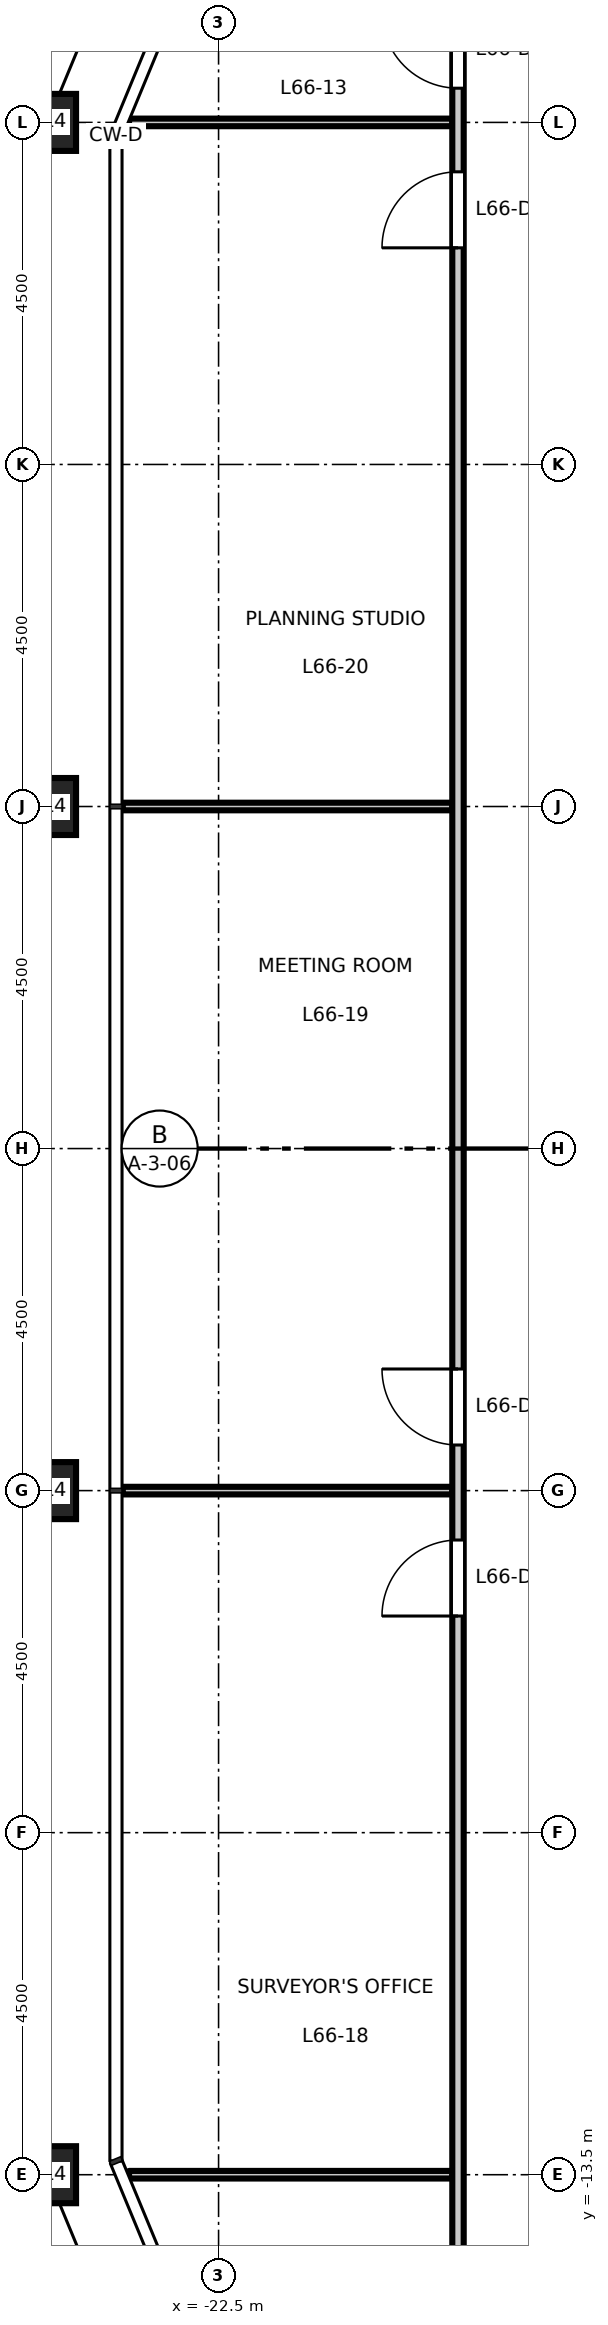
"""IFC4 building model, lengths in metres.
Left out: names, types, materials, properties, quantities, classifications, styles, units other than length and angle.
Written with IfcOpenShell. Run it as: python <this file> out.ifc"""

import sys

from ifc_helpers import new_model, si_unit, direction, frame, frame_2d, origin, origin_2d, place, context, subcontext, project, spatial, rectangle, hollow_rectangle, extrude, element, fill, save


model = new_model("IFC4")
c1 = context("Model", 3, precision=1e-05, world=origin(), true_north=direction((0.0, 1.0)))
c2 = subcontext(c1, "Body", "Model", "MODEL_VIEW")
j1 = project(units=[si_unit("LENGTHUNIT", "METRE"), si_unit("PLANEANGLEUNIT", "RADIAN")], contexts=[c1])
p1 = place(None, origin())
s1 = spatial("IfcSite", under=j1, at=p1, CompositionType="ELEMENT")
p2 = place(p1, origin())
s2 = spatial("IfcBuilding", under=s1, at=p2, CompositionType="ELEMENT")
p3 = place(p2, frame((0.0, 0.0, 307.7)))
s3 = spatial("IfcBuildingStorey", under=s2, at=p3, CompositionType="ELEMENT", Elevation=307.7)
for number, where, z_axis, x_axis in (
    (1, (-24.75, 13.5, 0.0), (0.0, 0.0, 1.0), (1.0, 0.0, 0.0)),
    (2, (-24.75, 4.5, 0.0), (0.0, 0.0, 1.0), (1.0, 0.0, 0.0)),
    (3, (-24.75, -4.5, 0.0), (0.0, 0.0, 1.0), (1.0, 0.0, 0.0)),
    (4, (-24.75, -13.5, 0.0), (0.0, 0.0, 1.0), (1.0, 0.0, 0.0)),
):
    element("IfcColumn", number, at=place(p3, frame(where, z_axis=z_axis, x_axis=x_axis)), inside=s3, PredefinedType="COLUMN", context=c2, shape_type="SweptSolid", body=[
        extrude(hollow_rectangle(XDim=0.75, YDim=0.75, WallThickness=0.04, at=origin_2d()), origin(), (0.0, 0.0, 1.0), 4.5),
    ])
p4 = place(p3, frame((-23.678, -13.5, 0.0), z_axis=(0.0, 0.0, 1.0), x_axis=(1.0, 0.0, 0.0)))
e5 = element("IfcWall", 5, at=p4, inside=s3, PredefinedType="PARTITIONING", context=c2, shape_type="SweptSolid", body=[
    extrude(rectangle(XDim=4.253, YDim=0.1, at=frame_2d((2.126, 0.0))), origin(), (0.0, 0.0, 1.0), 4.35),
])
for number, where, z_axis, x_axis in (
    (6, (-23.76, -4.5, 0.0), (0.0, 0.0, 1.0), (1.0, 0.0, 0.0)),
    (7, (-23.76, 4.5, 0.0), (0.0, 0.0, 1.0), (1.0, 0.0, 0.0)),
):
    element("IfcWall", number, at=place(p3, frame(where, z_axis=z_axis, x_axis=x_axis)), inside=s3, PredefinedType="PARTITIONING", context=c2, shape_type="SweptSolid", body=[
        extrude(rectangle(XDim=4.335, YDim=0.1, at=frame_2d((2.167, 0.0))), origin(), (0.0, 0.0, 1.0), 4.35),
    ])
p5 = place(p3, frame((-23.678, 13.5, 0.0), z_axis=(0.0, 0.0, 1.0), x_axis=(1.0, 0.0, 0.0)))
e8 = element("IfcWall", 8, at=p5, inside=s3, PredefinedType="PARTITIONING", context=c2, shape_type="SweptSolid", body=[
    extrude(rectangle(XDim=4.253, YDim=0.1, at=frame_2d((2.126, 0.0))), origin(), (0.0, 0.0, 1.0), 4.35),
])
p6 = place(p3, frame((-19.35, -15.525, 0.0), z_axis=(0.0, 0.0, 1.0), x_axis=(0.0, 1.0, 0.0)))
e9 = element("IfcWall", 9, at=p6, inside=s3, PredefinedType="PARTITIONING", context=c2, shape_type="SweptSolid", body=[
    extrude(rectangle(XDim=31.05, YDim=0.15, at=frame_2d((15.525, 0.0))), origin(), (0.0, 0.0, 1.0), 4.35),
])
p7 = place(p6, frame((29.475, 0.0, 0.0)))
e10 = element("IfcOpeningElement", 10, at=p7, cuts=e9, PredefinedType="OPENING", context=c2, shape_type="SweptSolid", body=[
    extrude(rectangle(XDim=1.0, YDim=2.1, at=frame_2d((0.5, 1.05))), frame((0.0, 0.085, 0.0), z_axis=(0.0, -1.0, 0.0), x_axis=(1.0, 0.0, 0.0)), (0.0, 0.0, 1.0), 0.17),
])
p8 = place(p6, frame((9.375, 0.0, 0.0)))
e11 = element("IfcOpeningElement", 11, at=p8, cuts=e9, PredefinedType="OPENING", context=c2, shape_type="SweptSolid", body=[
    extrude(rectangle(XDim=1.0, YDim=2.1, at=frame_2d((0.5, 1.05))), frame((0.0, 0.085, 0.0), z_axis=(0.0, -1.0, 0.0), x_axis=(1.0, 0.0, 0.0)), (0.0, 0.0, 1.0), 0.17),
])
p9 = place(p6, frame((11.625, 0.0, 0.0)))
e12 = element("IfcOpeningElement", 12, at=p9, cuts=e9, PredefinedType="OPENING", context=c2, shape_type="SweptSolid", body=[
    extrude(rectangle(XDim=1.0, YDim=2.1, at=frame_2d((0.5, 1.05))), frame((0.0, 0.085, 0.0), z_axis=(0.0, -1.0, 0.0), x_axis=(1.0, 0.0, 0.0)), (0.0, 0.0, 1.0), 0.17),
])
p10 = place(p6, frame((27.375, 0.0, 0.0)))
e13 = element("IfcOpeningElement", 13, at=p10, cuts=e9, PredefinedType="OPENING", context=c2, shape_type="SweptSolid", body=[
    extrude(rectangle(XDim=1.0, YDim=2.1, at=frame_2d((0.5, 1.05))), frame((0.0, 0.085, 0.0), z_axis=(0.0, -1.0, 0.0), x_axis=(1.0, 0.0, 0.0)), (0.0, 0.0, 1.0), 0.17),
])
p11 = place(p7, origin())
e14 = element("IfcDoor", 14, at=p11, inside=s3, OperationType="SINGLE_SWING_RIGHT", PredefinedType="DOOR", context=c2, shape_type="SweptSolid", body=[
    extrude(rectangle(XDim=1.0, YDim=2.1, at=frame_2d((0.5, 1.05))), frame((0.0, 0.025, 0.0), z_axis=(0.0, -1.0, 0.0), x_axis=(1.0, 0.0, 0.0)), (0.0, 0.0, 1.0), 0.05),
])
fill(e10, e14)
p12 = place(p8, origin())
e15 = element("IfcDoor", 15, at=p12, inside=s3, OperationType="SINGLE_SWING_LEFT", PredefinedType="DOOR", context=c2, shape_type="SweptSolid", body=[
    extrude(rectangle(XDim=1.0, YDim=2.1, at=frame_2d((0.5, 1.05))), frame((0.0, 0.025, 0.0), z_axis=(0.0, -1.0, 0.0), x_axis=(1.0, 0.0, 0.0)), (0.0, 0.0, 1.0), 0.05),
])
fill(e11, e15)
p13 = place(p9, origin())
e16 = element("IfcDoor", 16, at=p13, inside=s3, OperationType="SINGLE_SWING_RIGHT", PredefinedType="DOOR", context=c2, shape_type="SweptSolid", body=[
    extrude(rectangle(XDim=1.0, YDim=2.1, at=frame_2d((0.5, 1.05))), frame((0.0, 0.025, 0.0), z_axis=(0.0, -1.0, 0.0), x_axis=(1.0, 0.0, 0.0)), (0.0, 0.0, 1.0), 0.05),
])
fill(e12, e16)
p14 = place(p10, origin())
e17 = element("IfcDoor", 17, at=p14, inside=s3, OperationType="SINGLE_SWING_LEFT", PredefinedType="DOOR", context=c2, shape_type="SweptSolid", body=[
    extrude(rectangle(XDim=1.0, YDim=2.1, at=frame_2d((0.5, 1.05))), frame((0.0, 0.025, 0.0), z_axis=(0.0, -1.0, 0.0), x_axis=(1.0, 0.0, 0.0)), (0.0, 0.0, 1.0), 0.05),
])
fill(e13, e17)
save(model, sys.argv[1])
